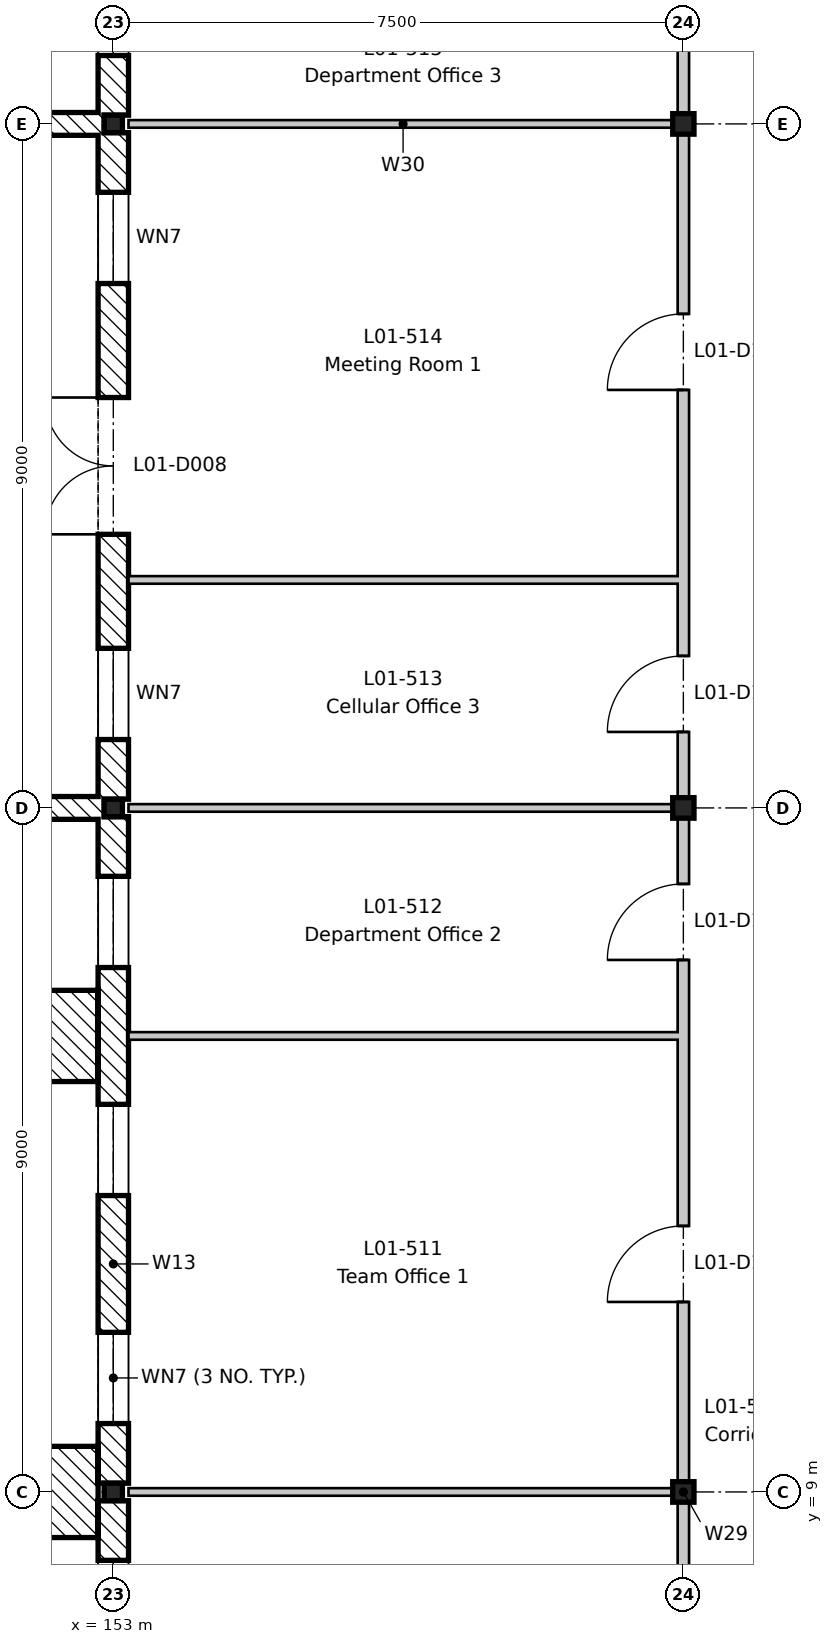
"""IFC4 building model, lengths in metres.
Left out: names, types, materials, properties, quantities, classifications, styles, units other than length and angle.
Written with IfcOpenShell. Run it as: python <this file> out.ifc"""

import sys

from ifc_helpers import new_model, si_unit, direction, frame, frame_2d, origin, origin_2d, place, context, subcontext, project, spatial, rectangle, i_section, extrude, element, fill, save


model = new_model("IFC4")
c1 = context("Model", 3, precision=1e-05, world=origin(), true_north=direction((0.0, 1.0)))
c2 = subcontext(c1, "Body", "Model", "MODEL_VIEW")
j1 = project(units=[si_unit("LENGTHUNIT", "METRE"), si_unit("PLANEANGLEUNIT", "RADIAN")], contexts=[c1])
p1 = place(None, origin())
s1 = spatial("IfcSite", under=j1, at=p1, CompositionType="ELEMENT")
p2 = place(p1, origin())
s2 = spatial("IfcBuilding", under=s1, at=p2, CompositionType="ELEMENT")
p3 = place(p2, frame((0.0, 0.0, 5.4)))
s3 = spatial("IfcBuildingStorey", under=s2, at=p3, CompositionType="ELEMENT", Elevation=5.4)
for number, where, z_axis, x_axis in (
    (1, (153.0, 9.0, -0.2), (0.0, 0.0, 1.0), (1.0, 0.0, 0.0)),
    (2, (153.0, 18.0, -0.2), (0.0, 0.0, 1.0), (1.0, 0.0, 0.0)),
    (3, (153.0, 27.0, -0.2), (0.0, 0.0, 1.0), (1.0, 0.0, 0.0)),
):
    element("IfcColumn", number, at=place(p3, frame(where, z_axis=z_axis, x_axis=x_axis)), inside=s3, PredefinedType="COLUMN", context=c2, shape_type="SweptSolid", body=[
        extrude(i_section(OverallWidth=0.24, OverallDepth=0.23, WebThickness=0.008, FlangeThickness=0.012, FilletRadius=0.021, at=origin_2d()), origin(), (0.0, 0.0, 1.0), 4.5),
    ])
for number, where, z_axis, x_axis in (
    (4, (160.5, 9.0, -0.2), (0.0, 0.0, 1.0), (1.0, 0.0, 0.0)),
    (5, (160.5, 18.0, -0.2), (0.0, 0.0, 1.0), (1.0, 0.0, 0.0)),
    (6, (160.5, 27.0, -0.2), (0.0, 0.0, 1.0), (1.0, 0.0, 0.0)),
):
    element("IfcColumn", number, at=place(p3, frame(where, z_axis=z_axis, x_axis=x_axis)), inside=s3, PredefinedType="COLUMN", context=c2, shape_type="SweptSolid", body=[
        extrude(i_section(OverallWidth=0.28, OverallDepth=0.27, WebThickness=0.008, FlangeThickness=0.013, FilletRadius=0.024, at=origin_2d()), origin(), (0.0, 0.0, 1.0), 4.5),
    ])
p4 = place(p3, frame((153.0, 0.115, 0.0), z_axis=(0.0, 0.0, 1.0), x_axis=(0.0, 1.0, 0.0)))
e7 = element("IfcWall", 7, at=p4, inside=s3, PredefinedType="STANDARD", context=c2, shape_type="SweptSolid", body=[
    extrude(rectangle(XDim=8.77, YDim=0.4, at=frame_2d((4.385, 0.0))), origin(), (0.0, 0.0, 1.0), 3.9),
])
p5 = place(p4, frame((0.785, 0.0, 0.9)))
e8 = element("IfcOpeningElement", 8, at=p5, cuts=e7, PredefinedType="OPENING", context=c2, shape_type="SweptSolid", body=[
    extrude(rectangle(XDim=1.2, YDim=2.4, at=frame_2d((0.6, 1.2))), frame((0.0, 0.21, 0.0), z_axis=(0.0, -1.0, 0.0), x_axis=(1.0, 0.0, 0.0)), (0.0, 0.0, 1.0), 0.42),
])
p6 = place(p4, frame((3.785, 0.0, 0.9)))
e9 = element("IfcOpeningElement", 9, at=p6, cuts=e7, PredefinedType="OPENING", context=c2, shape_type="SweptSolid", body=[
    extrude(rectangle(XDim=1.2, YDim=2.4, at=frame_2d((0.6, 1.2))), frame((0.0, 0.21, 0.0), z_axis=(0.0, -1.0, 0.0), x_axis=(1.0, 0.0, 0.0)), (0.0, 0.0, 1.0), 0.42),
])
p7 = place(p4, frame((6.785, 0.0, 0.9)))
e10 = element("IfcOpeningElement", 10, at=p7, cuts=e7, PredefinedType="OPENING", context=c2, shape_type="SweptSolid", body=[
    extrude(rectangle(XDim=1.2, YDim=2.4, at=frame_2d((0.6, 1.2))), frame((0.0, 0.21, 0.0), z_axis=(0.0, -1.0, 0.0), x_axis=(1.0, 0.0, 0.0)), (0.0, 0.0, 1.0), 0.42),
])
p8 = place(p3, frame((153.0, 9.115, 0.0), z_axis=(0.0, 0.0, 1.0), x_axis=(0.0, 1.0, 0.0)))
e11 = element("IfcWall", 11, at=p8, inside=s3, PredefinedType="STANDARD", context=c2, shape_type="SweptSolid", body=[
    extrude(rectangle(XDim=8.77, YDim=0.4, at=frame_2d((4.385, 0.0))), origin(), (0.0, 0.0, 1.0), 3.9),
])
p9 = place(p8, frame((0.785, 0.0, 0.9)))
e12 = element("IfcOpeningElement", 12, at=p9, cuts=e11, PredefinedType="OPENING", context=c2, shape_type="SweptSolid", body=[
    extrude(rectangle(XDim=1.2, YDim=2.4, at=frame_2d((0.6, 1.2))), frame((0.0, 0.21, 0.0), z_axis=(0.0, -1.0, 0.0), x_axis=(1.0, 0.0, 0.0)), (0.0, 0.0, 1.0), 0.42),
])
p10 = place(p8, frame((3.785, 0.0, 0.9)))
e13 = element("IfcOpeningElement", 13, at=p10, cuts=e11, PredefinedType="OPENING", context=c2, shape_type="SweptSolid", body=[
    extrude(rectangle(XDim=1.2, YDim=2.4, at=frame_2d((0.6, 1.2))), frame((0.0, 0.21, 0.0), z_axis=(0.0, -1.0, 0.0), x_axis=(1.0, 0.0, 0.0)), (0.0, 0.0, 1.0), 0.42),
])
p11 = place(p8, frame((6.785, 0.0, 0.9)))
e14 = element("IfcOpeningElement", 14, at=p11, cuts=e11, PredefinedType="OPENING", context=c2, shape_type="SweptSolid", body=[
    extrude(rectangle(XDim=1.2, YDim=2.4, at=frame_2d((0.6, 1.2))), frame((0.0, 0.21, 0.0), z_axis=(0.0, -1.0, 0.0), x_axis=(1.0, 0.0, 0.0)), (0.0, 0.0, 1.0), 0.42),
])
p12 = place(p3, frame((153.0, 18.115, 0.0), z_axis=(0.0, 0.0, 1.0), x_axis=(0.0, 1.0, 0.0)))
e15 = element("IfcWall", 15, at=p12, inside=s3, PredefinedType="STANDARD", context=c2, shape_type="SweptSolid", body=[
    extrude(rectangle(XDim=8.77, YDim=0.4, at=frame_2d((4.385, 0.0))), origin(), (0.0, 0.0, 1.0), 3.9),
])
p13 = place(p12, frame((3.485, 0.0, 0.0)))
e16 = element("IfcOpeningElement", 16, at=p13, cuts=e15, PredefinedType="OPENING", context=c2, shape_type="SweptSolid", body=[
    extrude(rectangle(XDim=1.8, YDim=2.4, at=frame_2d((0.9, 1.2))), frame((0.0, 0.21, 0.0), z_axis=(0.0, -1.0, 0.0), x_axis=(1.0, 0.0, 0.0)), (0.0, 0.0, 1.0), 0.42),
])
p14 = place(p12, frame((0.785, 0.0, 0.9)))
e17 = element("IfcOpeningElement", 17, at=p14, cuts=e15, PredefinedType="OPENING", context=c2, shape_type="SweptSolid", body=[
    extrude(rectangle(XDim=1.2, YDim=2.4, at=frame_2d((0.6, 1.2))), frame((0.0, 0.21, 0.0), z_axis=(0.0, -1.0, 0.0), x_axis=(1.0, 0.0, 0.0)), (0.0, 0.0, 1.0), 0.42),
])
p15 = place(p12, frame((6.785, 0.0, 0.9)))
e18 = element("IfcOpeningElement", 18, at=p15, cuts=e15, PredefinedType="OPENING", context=c2, shape_type="SweptSolid", body=[
    extrude(rectangle(XDim=1.2, YDim=2.4, at=frame_2d((0.6, 1.2))), frame((0.0, 0.21, 0.0), z_axis=(0.0, -1.0, 0.0), x_axis=(1.0, 0.0, 0.0)), (0.0, 0.0, 1.0), 0.42),
])
p16 = place(p3, frame((153.0, 27.115, 0.0), z_axis=(0.0, 0.0, 1.0), x_axis=(0.0, 1.0, 0.0)))
e19 = element("IfcWall", 19, at=p16, inside=s3, PredefinedType="STANDARD", context=c2, shape_type="SweptSolid", body=[
    extrude(rectangle(XDim=8.77, YDim=0.4, at=frame_2d((4.385, 0.0))), origin(), (0.0, 0.0, 1.0), 3.9),
])
p17 = place(p16, frame((3.485, 0.0, 0.0)))
e20 = element("IfcOpeningElement", 20, at=p17, cuts=e19, PredefinedType="OPENING", context=c2, shape_type="SweptSolid", body=[
    extrude(rectangle(XDim=1.8, YDim=2.4, at=frame_2d((0.9, 1.2))), frame((0.0, 0.21, 0.0), z_axis=(0.0, -1.0, 0.0), x_axis=(1.0, 0.0, 0.0)), (0.0, 0.0, 1.0), 0.42),
])
p18 = place(p16, frame((0.785, 0.0, 0.9)))
e21 = element("IfcOpeningElement", 21, at=p18, cuts=e19, PredefinedType="OPENING", context=c2, shape_type="SweptSolid", body=[
    extrude(rectangle(XDim=1.2, YDim=2.4, at=frame_2d((0.6, 1.2))), frame((0.0, 0.21, 0.0), z_axis=(0.0, -1.0, 0.0), x_axis=(1.0, 0.0, 0.0)), (0.0, 0.0, 1.0), 0.42),
])
p19 = place(p16, frame((6.785, 0.0, 0.9)))
e22 = element("IfcOpeningElement", 22, at=p19, cuts=e19, PredefinedType="OPENING", context=c2, shape_type="SweptSolid", body=[
    extrude(rectangle(XDim=1.2, YDim=2.4, at=frame_2d((0.6, 1.2))), frame((0.0, 0.21, 0.0), z_axis=(0.0, -1.0, 0.0), x_axis=(1.0, 0.0, 0.0)), (0.0, 0.0, 1.0), 0.42),
])
for number, where, z_axis, x_axis in (
    (23, (152.2, 8.4, 0.0), (0.0, 0.0, 1.0), (0.0, 1.0, 0.0)),
    (24, (152.2, 14.4, 0.0), (0.0, 0.0, 1.0), (0.0, 1.0, 0.0)),
):
    element("IfcWall", number, at=place(p3, frame(where, z_axis=z_axis, x_axis=x_axis)), inside=s3, PredefinedType="STANDARD", context=c2, shape_type="SweptSolid", body=[
        extrude(rectangle(XDim=1.2, YDim=1.2, at=frame_2d((0.6, 0.0))), origin(), (0.0, 0.0, 1.0), 4.5),
    ])
for number, where, z_axis, x_axis in (
    (25, (152.88, 18.0, 0.0), (0.0, 0.0, 1.0), (-1.0, 0.0, 0.0)),
    (26, (152.88, 27.0, 0.0), (0.0, 0.0, 1.0), (-1.0, 0.0, 0.0)),
):
    element("IfcWall", number, at=place(p3, frame(where, z_axis=z_axis, x_axis=x_axis)), inside=s3, PredefinedType="STANDARD", context=c2, shape_type="SweptSolid", body=[
        extrude(rectangle(XDim=2.88, YDim=0.3, at=frame_2d((1.44, 0.0))), origin(), (0.0, 0.0, 1.0), 3.97),
    ])
p20 = place(p3, frame((153.2, 9.0, 0.0), z_axis=(0.0, 0.0, 1.0), x_axis=(1.0, 0.0, 0.0)))
e27 = element("IfcWall", 27, at=p20, inside=s3, PredefinedType="PARTITIONING", context=c2, shape_type="SweptSolid", body=[
    extrude(rectangle(XDim=7.225, YDim=0.1, at=frame_2d((3.613, 0.0))), origin(), (0.0, 0.0, 1.0), 3.95),
])
p21 = place(p3, frame((153.2, 15.0, 0.0), z_axis=(0.0, 0.0, 1.0), x_axis=(1.0, 0.0, 0.0)))
e28 = element("IfcWall", 28, at=p21, inside=s3, PredefinedType="PARTITIONING", context=c2, shape_type="SweptSolid", body=[
    extrude(rectangle(XDim=7.225, YDim=0.1, at=frame_2d((3.613, 0.0))), origin(), (0.0, 0.0, 1.0), 4.3),
])
p22 = place(p3, frame((153.2, 18.0, 0.0), z_axis=(0.0, 0.0, 1.0), x_axis=(1.0, 0.0, 0.0)))
e29 = element("IfcWall", 29, at=p22, inside=s3, PredefinedType="PARTITIONING", context=c2, shape_type="SweptSolid", body=[
    extrude(rectangle(XDim=7.225, YDim=0.1, at=frame_2d((3.613, 0.0))), origin(), (0.0, 0.0, 1.0), 3.95),
])
p23 = place(p3, frame((153.2, 21.0, 0.0), z_axis=(0.0, 0.0, 1.0), x_axis=(1.0, 0.0, 0.0)))
e30 = element("IfcWall", 30, at=p23, inside=s3, PredefinedType="PARTITIONING", context=c2, shape_type="SweptSolid", body=[
    extrude(rectangle(XDim=7.225, YDim=0.1, at=frame_2d((3.613, 0.0))), origin(), (0.0, 0.0, 1.0), 4.3),
])
p24 = place(p3, frame((153.2, 27.0, 0.0), z_axis=(0.0, 0.0, 1.0), x_axis=(1.0, 0.0, 0.0)))
e31 = element("IfcWall", 31, at=p24, inside=s3, PredefinedType="PARTITIONING", context=c2, shape_type="SweptSolid", body=[
    extrude(rectangle(XDim=7.225, YDim=0.1, at=frame_2d((3.613, 0.0))), origin(), (0.0, 0.0, 1.0), 3.95),
])
p25 = place(p3, frame((160.5, -8.8, 0.0), z_axis=(0.0, 0.0, 1.0), x_axis=(0.0, 1.0, 0.0)))
e32 = element("IfcWall", 32, at=p25, inside=s3, PredefinedType="PARTITIONING", context=c2, shape_type="SweptSolid", body=[
    extrude(rectangle(XDim=62.6, YDim=0.15, at=frame_2d((31.3, 0.0))), origin(), (0.0, 0.0, 1.0), 3.78),
])
p26 = place(p25, frame((3.6, 0.0, 0.0)))
e33 = element("IfcOpeningElement", 33, at=p26, cuts=e32, PredefinedType="OPENING", context=c2, shape_type="SweptSolid", body=[
    extrude(rectangle(XDim=1.4, YDim=2.1, at=frame_2d((0.7, 1.05))), frame((0.0, 0.085, 0.0), z_axis=(0.0, -1.0, 0.0), x_axis=(1.0, 0.0, 0.0)), (0.0, 0.0, 1.0), 0.17),
])
p27 = place(p25, frame((9.8, 0.0, 0.0)))
e34 = element("IfcOpeningElement", 34, at=p27, cuts=e32, PredefinedType="OPENING", context=c2, shape_type="SweptSolid", body=[
    extrude(rectangle(XDim=1.0, YDim=2.1, at=frame_2d((0.5, 1.05))), frame((0.0, 0.085, 0.0), z_axis=(0.0, -1.0, 0.0), x_axis=(1.0, 0.0, 0.0)), (0.0, 0.0, 1.0), 0.17),
])
p28 = place(p25, frame((14.3, 0.0, 0.0)))
e35 = element("IfcOpeningElement", 35, at=p28, cuts=e32, PredefinedType="OPENING", context=c2, shape_type="SweptSolid", body=[
    extrude(rectangle(XDim=1.0, YDim=2.1, at=frame_2d((0.5, 1.05))), frame((0.0, 0.085, 0.0), z_axis=(0.0, -1.0, 0.0), x_axis=(1.0, 0.0, 0.0)), (0.0, 0.0, 1.0), 0.17),
])
p29 = place(p25, frame((20.3, 0.0, 0.0)))
e36 = element("IfcOpeningElement", 36, at=p29, cuts=e32, PredefinedType="OPENING", context=c2, shape_type="SweptSolid", body=[
    extrude(rectangle(XDim=1.0, YDim=2.1, at=frame_2d((0.5, 1.05))), frame((0.0, 0.085, 0.0), z_axis=(0.0, -1.0, 0.0), x_axis=(1.0, 0.0, 0.0)), (0.0, 0.0, 1.0), 0.17),
])
p30 = place(p25, frame((24.8, 0.0, 0.0)))
e37 = element("IfcOpeningElement", 37, at=p30, cuts=e32, PredefinedType="OPENING", context=c2, shape_type="SweptSolid", body=[
    extrude(rectangle(XDim=1.0, YDim=2.1, at=frame_2d((0.5, 1.05))), frame((0.0, 0.085, 0.0), z_axis=(0.0, -1.0, 0.0), x_axis=(1.0, 0.0, 0.0)), (0.0, 0.0, 1.0), 0.17),
])
p31 = place(p25, frame((27.8, 0.0, 0.0)))
e38 = element("IfcOpeningElement", 38, at=p31, cuts=e32, PredefinedType="OPENING", context=c2, shape_type="SweptSolid", body=[
    extrude(rectangle(XDim=1.0, YDim=2.1, at=frame_2d((0.5, 1.05))), frame((0.0, 0.085, 0.0), z_axis=(0.0, -1.0, 0.0), x_axis=(1.0, 0.0, 0.0)), (0.0, 0.0, 1.0), 0.17),
])
p32 = place(p25, frame((32.3, 0.0, 0.0)))
e39 = element("IfcOpeningElement", 39, at=p32, cuts=e32, PredefinedType="OPENING", context=c2, shape_type="SweptSolid", body=[
    extrude(rectangle(XDim=1.0, YDim=2.1, at=frame_2d((0.5, 1.05))), frame((0.0, 0.085, 0.0), z_axis=(0.0, -1.0, 0.0), x_axis=(1.0, 0.0, 0.0)), (0.0, 0.0, 1.0), 0.17),
])
p33 = place(p25, frame((36.8, 0.0, 0.0)))
e40 = element("IfcOpeningElement", 40, at=p33, cuts=e32, PredefinedType="OPENING", context=c2, shape_type="SweptSolid", body=[
    extrude(rectangle(XDim=1.0, YDim=2.1, at=frame_2d((0.5, 1.05))), frame((0.0, 0.085, 0.0), z_axis=(0.0, -1.0, 0.0), x_axis=(1.0, 0.0, 0.0)), (0.0, 0.0, 1.0), 0.17),
])
p34 = place(p25, frame((39.8, 0.0, 0.0)))
e41 = element("IfcOpeningElement", 41, at=p34, cuts=e32, PredefinedType="OPENING", context=c2, shape_type="SweptSolid", body=[
    extrude(rectangle(XDim=1.0, YDim=2.1, at=frame_2d((0.5, 1.05))), frame((0.0, 0.085, 0.0), z_axis=(0.0, -1.0, 0.0), x_axis=(1.0, 0.0, 0.0)), (0.0, 0.0, 1.0), 0.17),
])
p35 = place(p25, frame((45.6, 0.0, 0.0)))
e42 = element("IfcOpeningElement", 42, at=p35, cuts=e32, PredefinedType="OPENING", context=c2, shape_type="SweptSolid", body=[
    extrude(rectangle(XDim=1.4, YDim=2.1, at=frame_2d((0.7, 1.05))), frame((0.0, 0.085, 0.0), z_axis=(0.0, -1.0, 0.0), x_axis=(1.0, 0.0, 0.0)), (0.0, 0.0, 1.0), 0.17),
])
p36 = place(p25, frame((54.55, 0.0, 0.0)))
e43 = element("IfcOpeningElement", 43, at=p36, cuts=e32, PredefinedType="OPENING", context=c2, shape_type="SweptSolid", body=[
    extrude(rectangle(XDim=1.0, YDim=2.1, at=frame_2d((0.5, 1.05))), frame((0.0, 0.085, 0.0), z_axis=(0.0, -1.0, 0.0), x_axis=(1.0, 0.0, 0.0)), (0.0, 0.0, 1.0), 0.17),
])
p37 = place(p25, frame((57.8, 0.0, 0.0)))
e44 = element("IfcOpeningElement", 44, at=p37, cuts=e32, PredefinedType="OPENING", context=c2, shape_type="SweptSolid", body=[
    extrude(rectangle(XDim=1.0, YDim=2.1, at=frame_2d((0.5, 1.05))), frame((0.0, 0.085, 0.0), z_axis=(0.0, -1.0, 0.0), x_axis=(1.0, 0.0, 0.0)), (0.0, 0.0, 1.0), 0.17),
])
p38 = place(p25, frame((60.8, 0.0, 0.0)))
e45 = element("IfcOpeningElement", 45, at=p38, cuts=e32, PredefinedType="OPENING", context=c2, shape_type="SweptSolid", body=[
    extrude(rectangle(XDim=1.0, YDim=2.1, at=frame_2d((0.5, 1.05))), frame((0.0, 0.085, 0.0), z_axis=(0.0, -1.0, 0.0), x_axis=(1.0, 0.0, 0.0)), (0.0, 0.0, 1.0), 0.17),
])
p39 = place(p7, origin())
e46 = element("IfcWindow", 46, at=p39, inside=s3, PartitioningType="SINGLE_PANEL", PredefinedType="WINDOW", context=c2, shape_type="SweptSolid", body=[
    extrude(rectangle(XDim=1.2, YDim=2.4, at=frame_2d((0.6, 1.2))), frame((0.0, -0.12, 0.0), z_axis=(0.0, -1.0, 0.0), x_axis=(1.0, 0.0, 0.0)), (0.0, 0.0, 1.0), 0.06),
])
fill(e10, e46)
p40 = place(p9, origin())
e47 = element("IfcWindow", 47, at=p40, inside=s3, PartitioningType="SINGLE_PANEL", PredefinedType="WINDOW", context=c2, shape_type="SweptSolid", body=[
    extrude(rectangle(XDim=1.2, YDim=2.4, at=frame_2d((0.6, 1.2))), frame((0.0, -0.12, 0.0), z_axis=(0.0, -1.0, 0.0), x_axis=(1.0, 0.0, 0.0)), (0.0, 0.0, 1.0), 0.06),
])
fill(e12, e47)
p41 = place(p10, origin())
e48 = element("IfcWindow", 48, at=p41, inside=s3, PartitioningType="SINGLE_PANEL", PredefinedType="WINDOW", context=c2, shape_type="SweptSolid", body=[
    extrude(rectangle(XDim=1.2, YDim=2.4, at=frame_2d((0.6, 1.2))), frame((0.0, -0.12, 0.0), z_axis=(0.0, -1.0, 0.0), x_axis=(1.0, 0.0, 0.0)), (0.0, 0.0, 1.0), 0.06),
])
fill(e13, e48)
p42 = place(p11, origin())
e49 = element("IfcWindow", 49, at=p42, inside=s3, PartitioningType="SINGLE_PANEL", PredefinedType="WINDOW", context=c2, shape_type="SweptSolid", body=[
    extrude(rectangle(XDim=1.2, YDim=2.4, at=frame_2d((0.6, 1.2))), frame((0.0, -0.12, 0.0), z_axis=(0.0, -1.0, 0.0), x_axis=(1.0, 0.0, 0.0)), (0.0, 0.0, 1.0), 0.06),
])
fill(e14, e49)
p43 = place(p13, origin())
e50 = element("IfcDoor", 50, at=p43, inside=s3, OperationType="DOUBLE_DOOR_SINGLE_SWING", PredefinedType="DOOR", context=c2, shape_type="SweptSolid", body=[
    extrude(rectangle(XDim=1.8, YDim=2.4, at=frame_2d((0.9, 1.2))), frame((0.0, 0.025, 0.0), z_axis=(0.0, -1.0, 0.0), x_axis=(1.0, 0.0, 0.0)), (0.0, 0.0, 1.0), 0.05),
])
fill(e16, e50)
p44 = place(p14, origin())
e51 = element("IfcWindow", 51, at=p44, inside=s3, PartitioningType="SINGLE_PANEL", PredefinedType="WINDOW", context=c2, shape_type="SweptSolid", body=[
    extrude(rectangle(XDim=1.2, YDim=2.4, at=frame_2d((0.6, 1.2))), frame((0.0, -0.12, 0.0), z_axis=(0.0, -1.0, 0.0), x_axis=(1.0, 0.0, 0.0)), (0.0, 0.0, 1.0), 0.06),
])
fill(e17, e51)
p45 = place(p15, origin())
e52 = element("IfcWindow", 52, at=p45, inside=s3, PartitioningType="SINGLE_PANEL", PredefinedType="WINDOW", context=c2, shape_type="SweptSolid", body=[
    extrude(rectangle(XDim=1.2, YDim=2.4, at=frame_2d((0.6, 1.2))), frame((0.0, -0.12, 0.0), z_axis=(0.0, -1.0, 0.0), x_axis=(1.0, 0.0, 0.0)), (0.0, 0.0, 1.0), 0.06),
])
fill(e18, e52)
p46 = place(p18, origin())
e53 = element("IfcWindow", 53, at=p46, inside=s3, PartitioningType="SINGLE_PANEL", PredefinedType="WINDOW", context=c2, shape_type="SweptSolid", body=[
    extrude(rectangle(XDim=1.2, YDim=2.4, at=frame_2d((0.6, 1.2))), frame((0.0, -0.12, 0.0), z_axis=(0.0, -1.0, 0.0), x_axis=(1.0, 0.0, 0.0)), (0.0, 0.0, 1.0), 0.06),
])
fill(e21, e53)
p47 = place(p29, origin())
e54 = element("IfcDoor", 54, at=p47, inside=s3, OperationType="SINGLE_SWING_LEFT", PredefinedType="DOOR", context=c2, shape_type="SweptSolid", body=[
    extrude(rectangle(XDim=1.0, YDim=2.1, at=frame_2d((0.5, 1.05))), frame((0.0, 0.025, 0.0), z_axis=(0.0, -1.0, 0.0), x_axis=(1.0, 0.0, 0.0)), (0.0, 0.0, 1.0), 0.05),
])
fill(e36, e54)
p48 = place(p30, origin())
e55 = element("IfcDoor", 55, at=p48, inside=s3, OperationType="SINGLE_SWING_LEFT", PredefinedType="DOOR", context=c2, shape_type="SweptSolid", body=[
    extrude(rectangle(XDim=1.0, YDim=2.1, at=frame_2d((0.5, 1.05))), frame((0.0, 0.025, 0.0), z_axis=(0.0, -1.0, 0.0), x_axis=(1.0, 0.0, 0.0)), (0.0, 0.0, 1.0), 0.05),
])
fill(e37, e55)
p49 = place(p31, origin())
e56 = element("IfcDoor", 56, at=p49, inside=s3, OperationType="SINGLE_SWING_LEFT", PredefinedType="DOOR", context=c2, shape_type="SweptSolid", body=[
    extrude(rectangle(XDim=1.0, YDim=2.1, at=frame_2d((0.5, 1.05))), frame((0.0, 0.025, 0.0), z_axis=(0.0, -1.0, 0.0), x_axis=(1.0, 0.0, 0.0)), (0.0, 0.0, 1.0), 0.05),
])
fill(e38, e56)
p50 = place(p32, origin())
e57 = element("IfcDoor", 57, at=p50, inside=s3, OperationType="SINGLE_SWING_LEFT", PredefinedType="DOOR", context=c2, shape_type="SweptSolid", body=[
    extrude(rectangle(XDim=1.0, YDim=2.1, at=frame_2d((0.5, 1.05))), frame((0.0, 0.025, 0.0), z_axis=(0.0, -1.0, 0.0), x_axis=(1.0, 0.0, 0.0)), (0.0, 0.0, 1.0), 0.05),
])
fill(e39, e57)
save(model, sys.argv[1])
